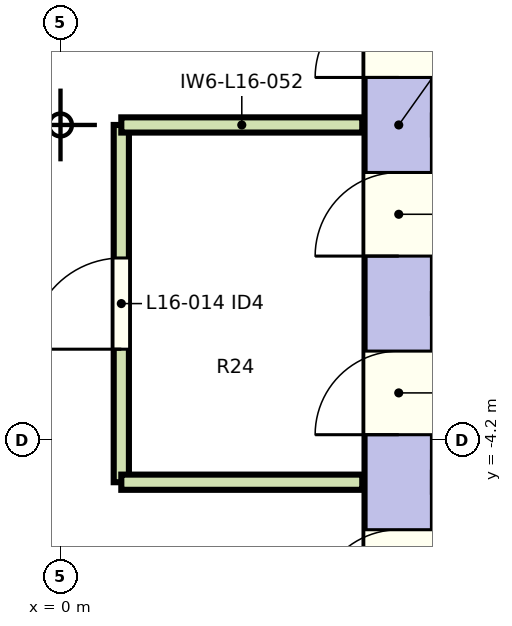
"""IFC4 building model, lengths in metres.
Left out: names, types, materials, properties, quantities, classifications, styles, units other than length and angle.
Written with IfcOpenShell. Run it as: python <this file> out.ifc"""

import sys

from ifc_helpers import new_model, si_unit, direction, frame, frame_2d, origin, place, context, subcontext, project, spatial, rectangle, extrude, element, fill, save


model = new_model("IFC4")
c1 = context("Model", 3, precision=1e-05, world=origin(), true_north=direction((0.0, 1.0)))
c2 = subcontext(c1, "Body", "Model", "MODEL_VIEW")
j1 = project(units=[si_unit("LENGTHUNIT", "METRE"), si_unit("PLANEANGLEUNIT", "RADIAN")], contexts=[c1])
p1 = place(None, origin())
s1 = spatial("IfcSite", under=j1, at=p1, CompositionType="ELEMENT")
p2 = place(p1, origin())
s2 = spatial("IfcBuilding", under=s1, at=p2, CompositionType="ELEMENT")
p3 = place(p2, frame((0.0, 0.0, 76.7)))
s3 = spatial("IfcBuildingStorey", under=s2, at=p3, CompositionType="ELEMENT", Elevation=76.7)
p4 = place(p3, frame((4.45, -11.633, 0.0), z_axis=(0.0, 0.0, 1.0), x_axis=(0.0, 1.0, 0.0)))
e1 = element("IfcWall", 1, at=p4, inside=s3, PredefinedType="SHEAR", context=c2, shape_type="SweptSolid", body=[
    extrude(rectangle(XDim=23.265, YDim=0.9, at=frame_2d((11.633, 0.0))), origin(), (0.0, 0.0, 1.0), 3.8),
])
p5 = place(p4, frame((7.558, 0.0, 0.0)))
e2 = element("IfcOpeningElement", 2, at=p5, cuts=e1, PredefinedType="OPENING", context=c2, shape_type="SweptSolid", body=[
    extrude(rectangle(XDim=1.1, YDim=2.1, at=frame_2d((0.55, 1.05))), frame((0.0, 0.46, 0.0), z_axis=(0.0, -1.0, 0.0), x_axis=(1.0, 0.0, 0.0)), (0.0, 0.0, 1.0), 0.92),
])
p6 = place(p4, frame((9.907, 0.0, 0.0)))
e3 = element("IfcOpeningElement", 3, at=p6, cuts=e1, PredefinedType="OPENING", context=c2, shape_type="SweptSolid", body=[
    extrude(rectangle(XDim=1.1, YDim=2.1, at=frame_2d((0.55, 1.05))), frame((0.0, 0.46, 0.0), z_axis=(0.0, -1.0, 0.0), x_axis=(1.0, 0.0, 0.0)), (0.0, 0.0, 1.0), 0.92),
])
p7 = place(p4, frame((12.258, 0.0, 0.0)))
e4 = element("IfcOpeningElement", 4, at=p7, cuts=e1, PredefinedType="OPENING", context=c2, shape_type="SweptSolid", body=[
    extrude(rectangle(XDim=1.1, YDim=2.1, at=frame_2d((0.55, 1.05))), frame((0.0, 0.46, 0.0), z_axis=(0.0, -1.0, 0.0), x_axis=(1.0, 0.0, 0.0)), (0.0, 0.0, 1.0), 0.92),
])
p8 = place(p4, frame((14.607, 0.0, 0.0)))
e5 = element("IfcOpeningElement", 5, at=p8, cuts=e1, PredefinedType="OPENING", context=c2, shape_type="SweptSolid", body=[
    extrude(rectangle(XDim=1.1, YDim=2.1, at=frame_2d((0.55, 1.05))), frame((0.0, 0.46, 0.0), z_axis=(0.0, -1.0, 0.0), x_axis=(1.0, 0.0, 0.0)), (0.0, 0.0, 1.0), 0.92),
])
p9 = place(p4, frame((5.208, 0.0, 0.0)))
e6 = element("IfcOpeningElement", 6, at=p9, cuts=e1, PredefinedType="OPENING", context=c2, shape_type="SweptSolid", body=[
    extrude(rectangle(XDim=1.1, YDim=2.1, at=frame_2d((0.55, 1.05))), frame((0.0, 0.46, 0.0), z_axis=(0.0, -1.0, 0.0), x_axis=(1.0, 0.0, 0.0)), (0.0, 0.0, 1.0), 0.92),
])
p10 = place(p4, frame((17.008, 0.0, 0.0)))
e7 = element("IfcOpeningElement", 7, at=p10, cuts=e1, PredefinedType="OPENING", context=c2, shape_type="SweptSolid", body=[
    extrude(rectangle(XDim=1.0, YDim=2.1, at=frame_2d((0.5, 1.05))), frame((0.0, 0.46, 0.0), z_axis=(0.0, -1.0, 0.0), x_axis=(1.0, 0.0, 0.0)), (0.0, 0.0, 1.0), 0.92),
])
p11 = place(p3, frame((0.8, -4.7, 0.0), z_axis=(0.0, 0.0, 1.0), x_axis=(0.0, 1.0, 0.0)))
e8 = element("IfcWall", 8, at=p11, inside=s3, PredefinedType="SOLIDWALL", context=c2, shape_type="SweptSolid", body=[
    extrude(rectangle(XDim=4.7, YDim=0.2, at=frame_2d((2.35, 0.0))), origin(), (0.0, 0.0, 1.0), 3.55),
])
p12 = place(p11, frame((1.75, 0.0, 0.0)))
e9 = element("IfcOpeningElement", 9, at=p12, cuts=e8, PredefinedType="OPENING", context=c2, shape_type="SweptSolid", body=[
    extrude(rectangle(XDim=1.2, YDim=2.1, at=frame_2d((0.6, 1.05))), frame((0.0, 0.11, 0.0), z_axis=(0.0, -1.0, 0.0), x_axis=(1.0, 0.0, 0.0)), (0.0, 0.0, 1.0), 0.22),
])
for number, where, z_axis, x_axis in (
    (10, (0.8, 0.0, 0.0), (0.0, 0.0, 1.0), (1.0, 0.0, 0.0)),
    (11, (3.97, -4.7, 0.0), (0.0, 0.0, 1.0), (-1.0, 0.0, 0.0)),
):
    element("IfcWall", number, at=place(p3, frame(where, z_axis=z_axis, x_axis=x_axis)), inside=s3, PredefinedType="SOLIDWALL", context=c2, shape_type="SweptSolid", body=[
        extrude(rectangle(XDim=3.17, YDim=0.2, at=frame_2d((1.585, 0.0))), origin(), (0.0, 0.0, 1.0), 3.55),
    ])
for number, where, z_axis, x_axis in (
    (12, (4.9, -4.7, 0.0), (0.0, 0.0, 1.0), (1.0, 0.0, 0.0)),
    (13, (4.9, 0.0, 0.0), (0.0, 0.0, 1.0), (1.0, 0.0, 0.0)),
):
    element("IfcWall", number, at=place(p3, frame(where, z_axis=z_axis, x_axis=x_axis)), inside=s3, PredefinedType="SOLIDWALL", context=c2, shape_type="SweptSolid", body=[
        extrude(rectangle(XDim=2.675, YDim=0.25, at=frame_2d((1.337, 0.0))), origin(), (0.0, 0.0, 1.0), 3.55),
    ])
p13 = place(p12, origin())
e14 = element("IfcDoor", 14, at=p13, inside=s3, OperationType="NOTDEFINED", PredefinedType="DOOR", context=c2, shape_type="SweptSolid", body=[
    extrude(rectangle(XDim=1.2, YDim=2.1, at=frame_2d((0.6, 1.05))), frame((0.0, 0.025, 0.0), z_axis=(0.0, -1.0, 0.0), x_axis=(1.0, 0.0, 0.0)), (0.0, 0.0, 1.0), 0.05),
])
fill(e9, e14)
p14 = place(p5, origin())
e15 = element("IfcDoor", 15, at=p14, inside=s3, OperationType="SLIDING_TO_LEFT", PredefinedType="DOOR", context=c2, shape_type="SweptSolid", body=[
    extrude(rectangle(XDim=1.1, YDim=2.1, at=frame_2d((0.55, 1.05))), frame((0.0, 0.025, 0.0), z_axis=(0.0, -1.0, 0.0), x_axis=(1.0, 0.0, 0.0)), (0.0, 0.0, 1.0), 0.05),
])
fill(e2, e15)
p15 = place(p6, origin())
e16 = element("IfcDoor", 16, at=p15, inside=s3, OperationType="SLIDING_TO_LEFT", PredefinedType="DOOR", context=c2, shape_type="SweptSolid", body=[
    extrude(rectangle(XDim=1.1, YDim=2.1, at=frame_2d((0.55, 1.05))), frame((0.0, 0.025, 0.0), z_axis=(0.0, -1.0, 0.0), x_axis=(1.0, 0.0, 0.0)), (0.0, 0.0, 1.0), 0.05),
])
fill(e3, e16)
p16 = place(p7, origin())
e17 = element("IfcDoor", 17, at=p16, inside=s3, OperationType="SLIDING_TO_LEFT", PredefinedType="DOOR", context=c2, shape_type="SweptSolid", body=[
    extrude(rectangle(XDim=1.1, YDim=2.1, at=frame_2d((0.55, 1.05))), frame((0.0, 0.025, 0.0), z_axis=(0.0, -1.0, 0.0), x_axis=(1.0, 0.0, 0.0)), (0.0, 0.0, 1.0), 0.05),
])
fill(e4, e17)
p17 = place(p9, origin())
e18 = element("IfcDoor", 18, at=p17, inside=s3, OperationType="SLIDING_TO_LEFT", PredefinedType="DOOR", context=c2, shape_type="SweptSolid", body=[
    extrude(rectangle(XDim=1.1, YDim=2.1, at=frame_2d((0.55, 1.05))), frame((0.0, 0.025, 0.0), z_axis=(0.0, -1.0, 0.0), x_axis=(1.0, 0.0, 0.0)), (0.0, 0.0, 1.0), 0.05),
])
fill(e6, e18)
save(model, sys.argv[1])
